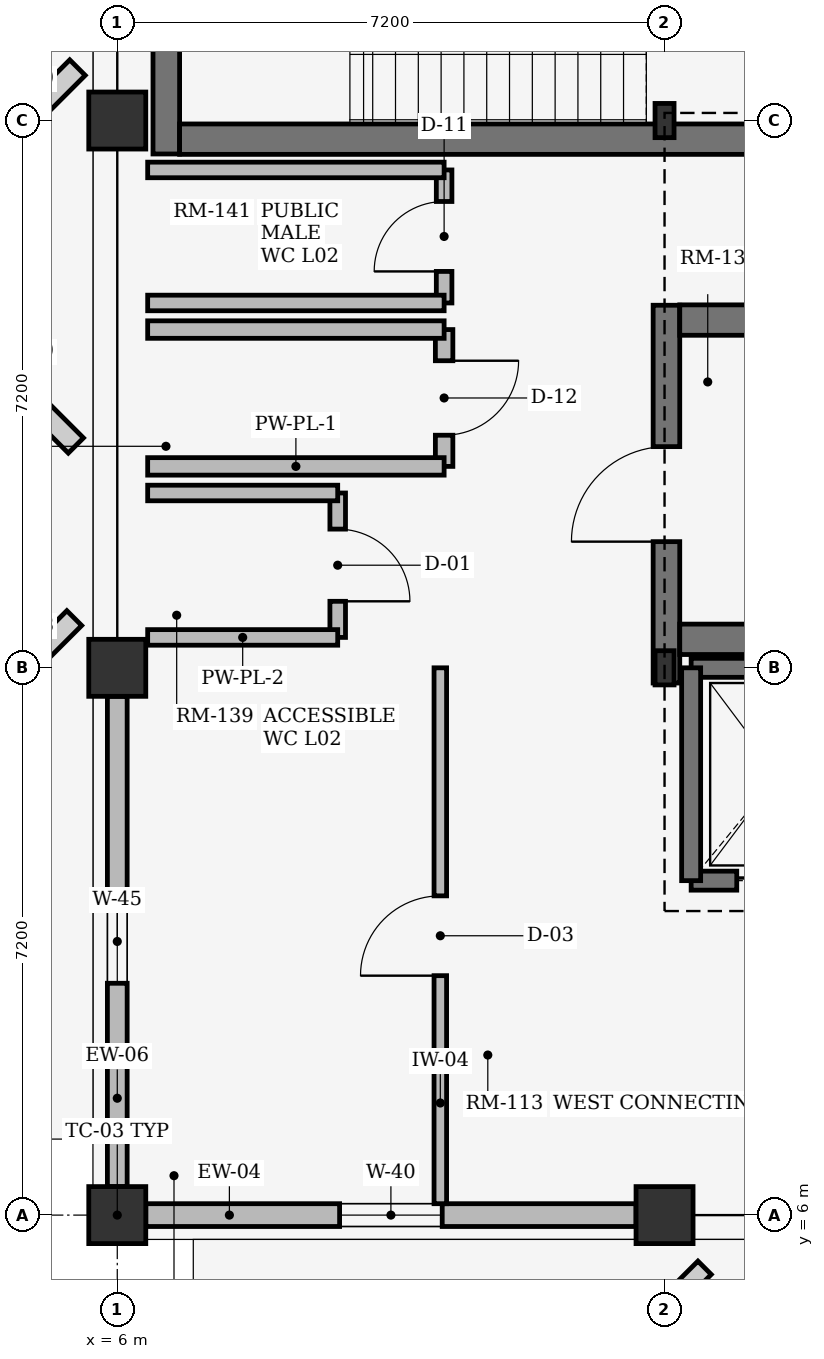
"""IFC4 building model, lengths in metres.
Left out: names, types, materials, properties, quantities, classifications, styles, units other than length and angle.
Written with IfcOpenShell. Run it as: python <this file> out.ifc"""

import sys

from ifc_helpers import new_model, si_unit, direction, frame, frame_2d, origin, origin_2d, place, context, subcontext, project, spatial, rectangle, i_section, extrude, element, fill, save


model = new_model("IFC4")
c1 = context("Model", 3, precision=1e-05, world=origin(), true_north=direction((0.0, 1.0)))
c2 = subcontext(c1, "Body", "Model", "MODEL_VIEW")
j1 = project(units=[si_unit("LENGTHUNIT", "METRE"), si_unit("PLANEANGLEUNIT", "RADIAN")], contexts=[c1])
p1 = place(None, origin())
s1 = spatial("IfcSite", under=j1, at=p1, CompositionType="ELEMENT")
p2 = place(p1, origin())
s2 = spatial("IfcBuilding", under=s1, at=p2, CompositionType="ELEMENT")
p3 = place(p2, frame((0.0, 0.0, 9.0)))
s3 = spatial("IfcBuildingStorey", under=s2, at=p3, CompositionType="ELEMENT", Elevation=9.0)
for number, where, z_axis, x_axis in (
    (1, (6.0, 6.0, 0.0), (0.0, 0.0, 1.0), (1.0, 0.0, 0.0)),
    (2, (6.0, 13.2, 0.0), (0.0, 0.0, 1.0), (1.0, 0.0, 0.0)),
    (3, (6.0, 20.4, 0.0), (0.0, 0.0, 1.0), (1.0, 0.0, 0.0)),
    (4, (13.2, 6.0, 0.0), (0.0, 0.0, 1.0), (1.0, 0.0, 0.0)),
):
    element("IfcColumn", number, at=place(p3, frame(where, z_axis=z_axis, x_axis=x_axis)), inside=s3, PredefinedType="COLUMN", context=c2, shape_type="SweptSolid", body=[
        extrude(rectangle(XDim=0.75, YDim=0.75, at=origin_2d()), origin(), (0.0, 0.0, 1.0), 3.96),
    ])
for number, where, z_axis, x_axis in (
    (5, (13.2, 13.2, 0.0), (0.0, 0.0, 1.0), (1.0, 0.0, 0.0)),
    (6, (13.2, 20.4, 0.0), (0.0, 0.0, 1.0), (1.0, 0.0, 0.0)),
):
    element("IfcColumn", number, at=place(p3, frame(where, z_axis=z_axis, x_axis=x_axis)), inside=s3, PredefinedType="COLUMN", context=c2, shape_type="SweptSolid", body=[
        extrude(i_section(OverallWidth=0.25, OverallDepth=0.45, WebThickness=0.011, FlangeThickness=0.014, at=origin_2d()), origin(), (0.0, 0.0, 1.0), 3.96),
    ])
p4 = place(p3, frame((6.375, 6.0, 0.0), z_axis=(0.0, 0.0, 1.0), x_axis=(1.0, 0.0, 0.0)))
e7 = element("IfcWall", 7, at=p4, inside=s3, PredefinedType="STANDARD", context=c2, shape_type="SweptSolid", body=[
    extrude(rectangle(XDim=6.45, YDim=0.3, at=frame_2d((3.225, 0.0))), origin(), (0.0, 0.0, 1.0), 3.34),
])
p5 = place(p4, frame((2.55, 0.0, 0.75)))
e8 = element("IfcOpeningElement", 8, at=p5, cuts=e7, PredefinedType="OPENING", context=c2, shape_type="SweptSolid", body=[
    extrude(rectangle(XDim=1.35, YDim=1.5, at=frame_2d((0.675, 0.75))), frame((0.0, 0.16, 0.0), z_axis=(0.0, -1.0, 0.0), x_axis=(1.0, 0.0, 0.0)), (0.0, 0.0, 1.0), 0.32),
])
p6 = place(p3, frame((6.0, 6.375, 0.0), z_axis=(0.0, 0.0, 1.0), x_axis=(0.0, 1.0, 0.0)))
e9 = element("IfcWall", 9, at=p6, inside=s3, PredefinedType="STANDARD", context=c2, shape_type="SweptSolid", body=[
    extrude(rectangle(XDim=6.45, YDim=0.26, at=frame_2d((3.225, 0.0))), origin(), (0.0, 0.0, 1.0), 3.34),
])
p7 = place(p6, frame((2.675, 0.0, 0.75)))
e10 = element("IfcOpeningElement", 10, at=p7, cuts=e9, PredefinedType="OPENING", context=c2, shape_type="SweptSolid", body=[
    extrude(rectangle(XDim=1.1, YDim=1.25, at=frame_2d((0.55, 0.625))), frame((0.0, 0.14, 0.0), z_axis=(0.0, -1.0, 0.0), x_axis=(1.0, 0.0, 0.0)), (0.0, 0.0, 1.0), 0.28),
])
p8 = place(p3, frame((13.225, 13.0, 0.0), z_axis=(0.0, 0.0, 1.0), x_axis=(0.0, 1.0, 0.0)))
e11 = element("IfcWall", 11, at=p8, inside=s3, PredefinedType="SHEAR", context=c2, shape_type="SweptSolid", body=[
    extrude(rectangle(XDim=4.97, YDim=0.35, at=frame_2d((2.485, 0.0))), origin(), (0.0, 0.0, 1.0), 3.96),
])
p9 = place(p8, frame((1.86, 0.0, 0.0)))
e12 = element("IfcOpeningElement", 12, at=p9, cuts=e11, PredefinedType="OPENING", context=c2, shape_type="SweptSolid", body=[
    extrude(rectangle(XDim=1.25, YDim=2.2, at=frame_2d((0.625, 1.1))), frame((0.0, 0.185, 0.0), z_axis=(0.0, -1.0, 0.0), x_axis=(1.0, 0.0, 0.0)), (0.0, 0.0, 1.0), 0.37),
])
for number, where, z_axis, x_axis in (
    (13, (13.4, 13.575, 0.0), (0.0, 0.0, 1.0), (1.0, 0.0, 0.0)),
    (14, (13.4, 17.775, 0.0), (0.0, 0.0, 1.0), (1.0, 0.0, 0.0)),
):
    element("IfcWall", number, at=place(p3, frame(where, z_axis=z_axis, x_axis=x_axis)), inside=s3, PredefinedType="SHEAR", context=c2, shape_type="SweptSolid", body=[
        extrude(rectangle(XDim=7.98, YDim=0.4, at=frame_2d((3.99, 0.0))), origin(), (0.0, 0.0, 1.0), 3.96),
    ])
p10 = place(p3, frame((6.645, 24.55, 0.0), z_axis=(0.0, 0.0, 1.0), x_axis=(0.0, -1.0, 0.0)))
e15 = element("IfcWall", 15, at=p10, inside=s3, PredefinedType="SHEAR", context=c2, shape_type="SweptSolid", body=[
    extrude(rectangle(XDim=4.59, YDim=0.35, at=frame_2d((2.295, 0.0))), origin(), (0.0, 0.0, 1.0), 3.96),
])
p11 = place(p3, frame((14.8, 20.155, 0.0), z_axis=(0.0, 0.0, 1.0), x_axis=(-1.0, 0.0, 0.0)))
e16 = element("IfcWall", 16, at=p11, inside=s3, PredefinedType="SHEAR", context=c2, shape_type="SweptSolid", body=[
    extrude(rectangle(XDim=7.98, YDim=0.4, at=frame_2d((3.99, 0.0))), origin(), (0.0, 0.0, 1.0), 3.96),
])
p12 = place(p3, frame((13.55, 10.4, 0.0), z_axis=(0.0, 0.0, 1.0), x_axis=(1.0, 0.0, 0.0)))
e17 = element("IfcWall", 17, at=p12, inside=s3, PredefinedType="SHEAR", context=c2, shape_type="SweptSolid", body=[
    extrude(rectangle(XDim=2.3, YDim=0.25, at=frame_2d((1.15, 0.0))), origin(), (0.0, 0.0, 1.0), 3.96),
])
p13 = place(p12, frame((0.6, 0.0, 0.0)))
e18 = element("IfcOpeningElement", 18, at=p13, cuts=e17, PredefinedType="OPENING", context=c2, shape_type="SweptSolid", body=[
    extrude(rectangle(XDim=1.1, YDim=2.2, at=frame_2d((0.55, 1.1))), frame((0.0, 0.135, 0.0), z_axis=(0.0, -1.0, 0.0), x_axis=(1.0, 0.0, 0.0)), (0.0, 0.0, 1.0), 0.27),
])
p14 = place(p3, frame((13.55, 13.2, 0.0), z_axis=(0.0, 0.0, 1.0), x_axis=(1.0, 0.0, 0.0)))
e19 = element("IfcWall", 19, at=p14, inside=s3, PredefinedType="SHEAR", context=c2, shape_type="SweptSolid", body=[
    extrude(rectangle(XDim=2.3, YDim=0.25, at=frame_2d((1.15, 0.0))), origin(), (0.0, 0.0, 1.0), 3.96),
])
p15 = place(p3, frame((13.55, 10.4, 0.0), z_axis=(0.0, 0.0, 1.0), x_axis=(0.0, 1.0, 0.0)))
e20 = element("IfcWall", 20, at=p15, inside=s3, PredefinedType="SHEAR", context=c2, shape_type="SweptSolid", body=[
    extrude(rectangle(XDim=2.8, YDim=0.25, at=frame_2d((1.4, 0.0))), origin(), (0.0, 0.0, 1.0), 3.96),
])
p16 = place(p3, frame((8.9, 13.6, 0.0), z_axis=(0.0, 0.0, 1.0), x_axis=(0.0, 1.0, 0.0)))
e21 = element("IfcWall", 21, at=p16, inside=s3, PredefinedType="PLUMBINGWALL", context=c2, shape_type="SweptSolid", body=[
    extrude(rectangle(XDim=1.9, YDim=0.205, at=frame_2d((0.95, 0.0))), origin(), (0.0, 0.0, 1.0), 3.94),
])
p17 = place(p16, frame((0.475, 0.0, 0.0)))
e22 = element("IfcOpeningElement", 22, at=p17, cuts=e21, PredefinedType="OPENING", context=c2, shape_type="SweptSolid", body=[
    extrude(rectangle(XDim=0.95, YDim=2.15, at=frame_2d((0.475, 1.075))), frame((0.0, 0.113, 0.0), z_axis=(0.0, -1.0, 0.0), x_axis=(1.0, 0.0, 0.0)), (0.0, 0.0, 1.0), 0.225),
])
for number, where, z_axis, x_axis in (
    (23, (6.4, 13.6, 0.0), (0.0, 0.0, 1.0), (1.0, 0.0, 0.0)),
    (24, (6.4, 15.5, 0.0), (0.0, 0.0, 1.0), (1.0, 0.0, 0.0)),
):
    element("IfcWall", number, at=place(p3, frame(where, z_axis=z_axis, x_axis=x_axis)), inside=s3, PredefinedType="PLUMBINGWALL", context=c2, shape_type="SweptSolid", body=[
        extrude(rectangle(XDim=2.5, YDim=0.205, at=frame_2d((1.25, 0.0))), origin(), (0.0, 0.0, 1.0), 3.94),
    ])
p18 = place(p3, frame((10.3, 15.85, 0.0), z_axis=(0.0, 0.0, 1.0), x_axis=(0.0, 1.0, 0.0)))
e25 = element("IfcWall", 25, at=p18, inside=s3, PredefinedType="PLUMBINGWALL", context=c2, shape_type="SweptSolid", body=[
    extrude(rectangle(XDim=1.8, YDim=0.23, at=frame_2d((0.9, 0.0))), origin(), (0.0, 0.0, 1.0), 3.94),
])
p19 = place(p18, frame((0.41, 0.0, 0.0)))
e26 = element("IfcOpeningElement", 26, at=p19, cuts=e25, PredefinedType="OPENING", context=c2, shape_type="SweptSolid", body=[
    extrude(rectangle(XDim=0.98, YDim=2.1, at=frame_2d((0.49, 1.05))), frame((0.0, 0.125, 0.0), z_axis=(0.0, -1.0, 0.0), x_axis=(1.0, 0.0, 0.0)), (0.0, 0.0, 1.0), 0.25),
])
for number, where, z_axis, x_axis in (
    (27, (6.4, 15.85, 0.0), (0.0, 0.0, 1.0), (1.0, 0.0, 0.0)),
    (28, (6.4, 17.65, 0.0), (0.0, 0.0, 1.0), (1.0, 0.0, 0.0)),
):
    element("IfcWall", number, at=place(p3, frame(where, z_axis=z_axis, x_axis=x_axis)), inside=s3, PredefinedType="PLUMBINGWALL", context=c2, shape_type="SweptSolid", body=[
        extrude(rectangle(XDim=3.9, YDim=0.23, at=frame_2d((1.95, 0.0))), origin(), (0.0, 0.0, 1.0), 3.94),
    ])
p20 = place(p3, frame((10.3, 18.0, 0.0), z_axis=(0.0, 0.0, 1.0), x_axis=(0.0, 1.0, 0.0)))
e29 = element("IfcWall", 29, at=p20, inside=s3, PredefinedType="PLUMBINGWALL", context=c2, shape_type="SweptSolid", body=[
    extrude(rectangle(XDim=1.75, YDim=0.205, at=frame_2d((0.875, 0.0))), origin(), (0.0, 0.0, 1.0), 3.94),
])
p21 = place(p20, frame((0.415, 0.0, 0.0)))
e30 = element("IfcOpeningElement", 30, at=p21, cuts=e29, PredefinedType="OPENING", context=c2, shape_type="SweptSolid", body=[
    extrude(rectangle(XDim=0.92, YDim=2.1, at=frame_2d((0.46, 1.05))), frame((0.0, 0.113, 0.0), z_axis=(0.0, -1.0, 0.0), x_axis=(1.0, 0.0, 0.0)), (0.0, 0.0, 1.0), 0.225),
])
for number, where, z_axis, x_axis in (
    (31, (6.4, 18.0, 0.0), (0.0, 0.0, 1.0), (1.0, 0.0, 0.0)),
    (32, (6.4, 19.75, 0.0), (0.0, 0.0, 1.0), (1.0, 0.0, 0.0)),
):
    element("IfcWall", number, at=place(p3, frame(where, z_axis=z_axis, x_axis=x_axis)), inside=s3, PredefinedType="PLUMBINGWALL", context=c2, shape_type="SweptSolid", body=[
        extrude(rectangle(XDim=3.9, YDim=0.205, at=frame_2d((1.95, 0.0))), origin(), (0.0, 0.0, 1.0), 3.94),
    ])
p22 = place(p3, frame((10.25, 6.15, 0.0), z_axis=(0.0, 0.0, 1.0), x_axis=(0.0, 1.0, 0.0)))
e33 = element("IfcWall", 33, at=p22, inside=s3, PredefinedType="PARTITIONING", context=c2, shape_type="SweptSolid", body=[
    extrude(rectangle(XDim=7.05, YDim=0.165, at=frame_2d((3.525, 0.0))), origin(), (0.0, 0.0, 1.0), 3.94),
])
p23 = place(p22, frame((3.0, 0.0, 0.0)))
e34 = element("IfcOpeningElement", 34, at=p23, cuts=e33, PredefinedType="OPENING", context=c2, shape_type="SweptSolid", body=[
    extrude(rectangle(XDim=1.05, YDim=2.15, at=frame_2d((0.525, 1.075))), frame((0.0, 0.093, 0.0), z_axis=(0.0, -1.0, 0.0), x_axis=(1.0, 0.0, 0.0)), (0.0, 0.0, 1.0), 0.185),
])
p24 = place(p5, origin())
e35 = element("IfcWindow", 35, at=p24, inside=s3, PartitioningType="SINGLE_PANEL", PredefinedType="WINDOW", context=c2, shape_type="SweptSolid", body=[
    extrude(rectangle(XDim=1.35, YDim=1.5, at=frame_2d((0.675, 0.75))), frame((0.0, 0.03, 0.0), z_axis=(0.0, -1.0, 0.0), x_axis=(1.0, 0.0, 0.0)), (0.0, 0.0, 1.0), 0.06),
])
fill(e8, e35)
p25 = place(p7, origin())
e36 = element("IfcWindow", 36, at=p25, inside=s3, PartitioningType="SINGLE_PANEL", PredefinedType="WINDOW", context=c2, shape_type="SweptSolid", body=[
    extrude(rectangle(XDim=1.1, YDim=1.25, at=frame_2d((0.55, 0.625))), frame((0.0, 0.03, 0.0), z_axis=(0.0, -1.0, 0.0), x_axis=(1.0, 0.0, 0.0)), (0.0, 0.0, 1.0), 0.06),
])
fill(e10, e36)
p26 = place(p9, origin())
e37 = element("IfcDoor", 37, at=p26, inside=s3, OperationType="SINGLE_SWING_LEFT", PredefinedType="DOOR", context=c2, shape_type="SweptSolid", body=[
    extrude(rectangle(XDim=1.25, YDim=2.2, at=frame_2d((0.625, 1.1))), frame((0.0, 0.025, 0.0), z_axis=(0.0, -1.0, 0.0), x_axis=(1.0, 0.0, 0.0)), (0.0, 0.0, 1.0), 0.05),
])
fill(e12, e37)
p27 = place(p13, origin())
e38 = element("IfcDoor", 38, at=p27, inside=s3, OperationType="DOUBLE_DOOR_SLIDING", PredefinedType="DOOR", context=c2, shape_type="SweptSolid", body=[
    extrude(rectangle(XDim=1.1, YDim=2.2, at=frame_2d((0.55, 1.1))), frame((0.0, 0.025, 0.0), z_axis=(0.0, -1.0, 0.0), x_axis=(1.0, 0.0, 0.0)), (0.0, 0.0, 1.0), 0.05),
])
fill(e18, e38)
p28 = place(p17, frame((0.95, 0.0, 0.0), z_axis=(0.0, 0.0, 1.0), x_axis=(-1.0, 0.0, 0.0)))
e39 = element("IfcDoor", 39, at=p28, inside=s3, OperationType="SINGLE_SWING_LEFT", PredefinedType="DOOR", context=c2, shape_type="SweptSolid", body=[
    extrude(rectangle(XDim=0.95, YDim=2.15, at=frame_2d((0.475, 1.075))), frame((0.0, 0.025, 0.0), z_axis=(0.0, -1.0, 0.0), x_axis=(1.0, 0.0, 0.0)), (0.0, 0.0, 1.0), 0.05),
])
fill(e22, e39)
p29 = place(p19, origin())
e40 = element("IfcDoor", 40, at=p29, inside=s3, OperationType="SINGLE_SWING_RIGHT", PredefinedType="DOOR", context=c2, shape_type="SweptSolid", body=[
    extrude(rectangle(XDim=0.98, YDim=2.1, at=frame_2d((0.49, 1.05))), frame((0.0, 0.025, 0.0), z_axis=(0.0, -1.0, 0.0), x_axis=(1.0, 0.0, 0.0)), (0.0, 0.0, 1.0), 0.05),
])
fill(e26, e40)
p30 = place(p21, origin())
e41 = element("IfcDoor", 41, at=p30, inside=s3, OperationType="SINGLE_SWING_LEFT", PredefinedType="DOOR", context=c2, shape_type="SweptSolid", body=[
    extrude(rectangle(XDim=0.92, YDim=2.1, at=frame_2d((0.46, 1.05))), frame((0.0, 0.025, 0.0), z_axis=(0.0, -1.0, 0.0), x_axis=(1.0, 0.0, 0.0)), (0.0, 0.0, 1.0), 0.05),
])
fill(e30, e41)
p31 = place(p23, origin())
e42 = element("IfcDoor", 42, at=p31, inside=s3, OperationType="SINGLE_SWING_LEFT", PredefinedType="DOOR", context=c2, shape_type="SweptSolid", body=[
    extrude(rectangle(XDim=1.05, YDim=2.15, at=frame_2d((0.525, 1.075))), frame((0.0, 0.025, 0.0), z_axis=(0.0, -1.0, 0.0), x_axis=(1.0, 0.0, 0.0)), (0.0, 0.0, 1.0), 0.05),
])
fill(e34, e42)
save(model, sys.argv[1])
